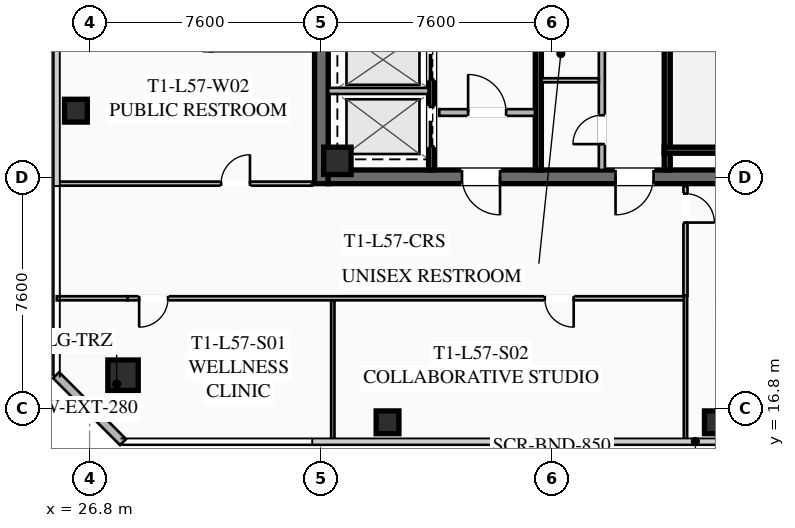
"""IFC4 building model, lengths in metres.
Left out: names, types, materials, properties, quantities, classifications, styles, units other than length and angle.
Written with IfcOpenShell. Run it as: python <this file> out.ifc"""

import sys

from ifc_helpers import new_model, si_unit, direction, frame, frame_2d, origin, origin_2d, place, context, subcontext, project, spatial, rectangle, hollow_rectangle, extrude, element, fill, save


model = new_model("IFC4")
c1 = context("Model", 3, precision=1e-05, world=origin(), true_north=direction((0.0, 1.0)))
c2 = subcontext(c1, "Body", "Model", "MODEL_VIEW")
j1 = project(units=[si_unit("LENGTHUNIT", "METRE"), si_unit("PLANEANGLEUNIT", "RADIAN")], contexts=[c1])
p1 = place(None, origin())
s1 = spatial("IfcSite", under=j1, at=p1, CompositionType="ELEMENT")
p2 = place(p1, origin())
s2 = spatial("IfcBuilding", under=s1, at=p2, CompositionType="ELEMENT")
p3 = place(p2, frame((0.0, 0.0, 211.3)))
s3 = spatial("IfcBuildingStorey", under=s2, at=p3, CompositionType="ELEMENT", Elevation=211.3)
p4 = place(p3, frame((34.425, 24.2, 0.0), z_axis=(0.0, 0.0, 1.0), x_axis=(0.0, 1.0, 0.0)))
e1 = element("IfcWall", 1, at=p4, inside=s3, PredefinedType="SHEAR", context=c2, shape_type="SweptSolid", body=[
    extrude(rectangle(XDim=15.6, YDim=0.45, at=frame_2d((7.8, 0.0))), origin(), (0.0, 0.0, 1.0), 3.55),
])
p5 = place(p3, frame((49.35, 24.425, 0.0), z_axis=(0.0, 0.0, 1.0), x_axis=(-1.0, 0.0, 0.0)))
e2 = element("IfcWall", 2, at=p5, inside=s3, PredefinedType="SHEAR", context=c2, shape_type="SweptSolid", body=[
    extrude(rectangle(XDim=14.7, YDim=0.45, at=frame_2d((7.35, 0.0))), origin(), (0.0, 0.0, 1.0), 3.55),
])
p6 = place(p5, frame((9.05, 0.0, 0.0)))
e3 = element("IfcOpeningElement", 3, at=p6, cuts=e2, PredefinedType="OPENING", context=c2, shape_type="SweptSolid", body=[
    extrude(rectangle(XDim=1.25, YDim=2.25, at=frame_2d((0.625, 1.125))), frame((0.0, 0.235, 0.0), z_axis=(0.0, -1.0, 0.0), x_axis=(1.0, 0.0, 0.0)), (0.0, 0.0, 1.0), 0.47),
])
p7 = place(p5, frame((4.0, 0.0, 0.0)))
e4 = element("IfcOpeningElement", 4, at=p7, cuts=e2, PredefinedType="OPENING", context=c2, shape_type="SweptSolid", body=[
    extrude(rectangle(XDim=1.25, YDim=2.25, at=frame_2d((0.625, 1.125))), frame((0.0, 0.235, 0.0), z_axis=(0.0, -1.0, 0.0), x_axis=(1.0, 0.0, 0.0)), (0.0, 0.0, 1.0), 0.47),
])
p8 = place(p3, frame((34.95, 24.95, 0.0), z_axis=(0.0, 0.0, 1.0), x_axis=(1.0, 0.0, 0.0)))
e5 = element("IfcColumn", 5, at=p8, inside=s3, PredefinedType="COLUMN", context=c2, shape_type="SweptSolid", body=[
    extrude(hollow_rectangle(XDim=0.9, YDim=0.9, WallThickness=0.04, at=origin_2d()), origin(), (0.0, 0.0, 1.0), 3.37),
])
p9 = place(p3, frame((27.9, 17.9, 0.0), z_axis=(0.0, 0.0, 1.0), x_axis=(1.0, 0.0, 0.0)))
e6 = element("IfcColumn", 6, at=p9, inside=s3, PredefinedType="COLUMN", context=c2, shape_type="SweptSolid", body=[
    extrude(hollow_rectangle(XDim=1.0, YDim=1.0, WallThickness=0.04, at=origin_2d()), origin(), (0.0, 0.0, 1.0), 3.37),
])
for number, where, z_axis, x_axis in (
    (7, (36.6, 16.35, 0.0), (0.0, 0.0, 1.0), (1.0, 0.0, 0.0)),
    (8, (47.4, 16.35, 0.0), (0.0, 0.0, 1.0), (1.0, 0.0, 0.0)),
    (9, (26.35, 26.6, 0.0), (0.0, 0.0, 1.0), (1.0, 0.0, 0.0)),
):
    element("IfcColumn", number, at=place(p3, frame(where, z_axis=z_axis, x_axis=x_axis)), inside=s3, PredefinedType="COLUMN", context=c2, shape_type="SweptSolid", body=[
        extrude(hollow_rectangle(XDim=0.75, YDim=0.75, WallThickness=0.032, at=origin_2d()), origin(), (0.0, 0.0, 1.0), 3.37),
    ])
p10 = place(p3, frame((27.9, 15.7, 0.0), z_axis=(0.0, 0.0, 1.0), x_axis=(-0.707106781187, 0.707106781187, 0.0)))
e10 = element("IfcWall", 10, at=p10, inside=s3, PredefinedType="SOLIDWALL", context=c2, shape_type="SweptSolid", body=[
    extrude(rectangle(XDim=3.111, YDim=0.28, at=frame_2d((1.556, 0.0))), origin(), (0.0, 0.0, 1.0), 3.37),
])
p11 = place(p3, frame((45.8, 32.8, 0.0), z_axis=(0.0, 0.0, 1.0), x_axis=(0.0, -1.0, 0.0)))
e11 = element("IfcWall", 11, at=p11, inside=s3, PredefinedType="SHEAR", context=c2, shape_type="SweptSolid", body=[
    extrude(rectangle(XDim=8.15, YDim=0.2, at=frame_2d((4.075, 0.0))), origin(), (0.0, 0.0, 1.0), 3.37),
])
p12 = place(p11, frame((0.45, 0.0, 0.0)))
e12 = element("IfcOpeningElement", 12, at=p12, cuts=e11, PredefinedType="OPENING", context=c2, shape_type="SweptSolid", body=[
    extrude(rectangle(XDim=1.15, YDim=2.2, at=frame_2d((0.575, 1.1))), frame((0.0, 0.11, 0.0), z_axis=(0.0, -1.0, 0.0), x_axis=(1.0, 0.0, 0.0)), (0.0, 0.0, 1.0), 0.22),
])
p13 = place(p3, frame((45.7, 25.3, 0.0), z_axis=(0.0, 0.0, 1.0), x_axis=(1.0, 0.0, 0.0)))
e13 = element("IfcWall", 13, at=p13, inside=s3, PredefinedType="SHEAR", context=c2, shape_type="SweptSolid", body=[
    extrude(rectangle(XDim=3.65, YDim=0.2, at=frame_2d((1.825, 0.0))), origin(), (0.0, 0.0, 1.0), 3.37),
])
p14 = place(p3, frame((41.56, 24.65, 0.0), z_axis=(0.0, 0.0, 1.0), x_axis=(0.0, 1.0, 0.0)))
e14 = element("IfcWall", 14, at=p14, inside=s3, PredefinedType="SHEAR", context=c2, shape_type="SweptSolid", body=[
    extrude(rectangle(XDim=14.7, YDim=0.2, at=frame_2d((7.35, 0.0))), origin(), (0.0, 0.0, 1.0), 3.37),
])
p15 = place(p3, frame((38.3, 26.54, 0.0), z_axis=(0.0, 0.0, 1.0), x_axis=(1.0, 0.0, 0.0)))
e15 = element("IfcWall", 15, at=p15, inside=s3, PredefinedType="SOLIDWALL", context=c2, shape_type="SweptSolid", body=[
    extrude(rectangle(XDim=3.15, YDim=0.22, at=frame_2d((1.575, 0.0))), origin(), (0.0, 0.0, 1.0), 2.723),
])
p16 = place(p15, frame((0.95, 0.0, 0.0)))
e16 = element("IfcOpeningElement", 16, at=p16, cuts=e15, PredefinedType="OPENING", context=c2, shape_type="SweptSolid", body=[
    extrude(rectangle(XDim=1.25, YDim=2.25, at=frame_2d((0.625, 1.125))), frame((0.0, 0.12, 0.0), z_axis=(0.0, -1.0, 0.0), x_axis=(1.0, 0.0, 0.0)), (0.0, 0.0, 1.0), 0.24),
])
p17 = place(p3, frame((38.05, 24.65, 0.0), z_axis=(0.0, 0.0, 1.0), x_axis=(0.0, 1.0, 0.0)))
e17 = element("IfcWall", 17, at=p17, inside=s3, PredefinedType="SHEAR", context=c2, shape_type="SweptSolid", body=[
    extrude(rectangle(XDim=6.55, YDim=0.2, at=frame_2d((3.275, 0.0))), origin(), (0.0, 0.0, 1.0), 3.37),
])
p18 = place(p17, frame((4.975, 0.0, 0.0)))
e18 = element("IfcOpeningElement", 18, at=p18, cuts=e17, PredefinedType="OPENING", context=c2, shape_type="SweptSolid", body=[
    extrude(rectangle(XDim=1.3, YDim=2.25, at=frame_2d((0.65, 1.125))), frame((0.0, 0.11, 0.0), z_axis=(0.0, -1.0, 0.0), x_axis=(1.0, 0.0, 0.0)), (0.0, 0.0, 1.0), 0.22),
])
p19 = place(p17, frame((2.975, 0.0, 0.0)))
e19 = element("IfcOpeningElement", 19, at=p19, cuts=e17, PredefinedType="OPENING", context=c2, shape_type="SweptSolid", body=[
    extrude(rectangle(XDim=1.3, YDim=2.25, at=frame_2d((0.65, 1.125))), frame((0.0, 0.11, 0.0), z_axis=(0.0, -1.0, 0.0), x_axis=(1.0, 0.0, 0.0)), (0.0, 0.0, 1.0), 0.22),
])
p20 = place(p17, frame((0.775, 0.0, 0.0)))
e20 = element("IfcOpeningElement", 20, at=p20, cuts=e17, PredefinedType="OPENING", context=c2, shape_type="SweptSolid", body=[
    extrude(rectangle(XDim=1.3, YDim=2.25, at=frame_2d((0.65, 1.125))), frame((0.0, 0.11, 0.0), z_axis=(0.0, -1.0, 0.0), x_axis=(1.0, 0.0, 0.0)), (0.0, 0.0, 1.0), 0.22),
])
p21 = place(p3, frame((34.65, 27.25, 0.0), z_axis=(0.0, 0.0, 1.0), x_axis=(1.0, 0.0, 0.0)))
e21 = element("IfcWall", 21, at=p21, inside=s3, PredefinedType="SOLIDWALL", context=c2, shape_type="SweptSolid", body=[
    extrude(rectangle(XDim=3.3, YDim=0.2, at=frame_2d((1.65, 0.0))), origin(), (0.0, 0.0, 1.0), 3.37),
])
p22 = place(p3, frame((43.65, 24.65, 0.0), z_axis=(0.0, 0.0, 1.0), x_axis=(0.0, 1.0, 0.0)))
e22 = element("IfcWall", 22, at=p22, inside=s3, PredefinedType="SOLIDWALL", context=c2, shape_type="SweptSolid", body=[
    extrude(rectangle(XDim=7.0, YDim=0.2, at=frame_2d((3.5, 0.0))), origin(), (0.0, 0.0, 1.0), 2.723),
])
p23 = place(p22, frame((0.85, 0.0, 0.0)))
e23 = element("IfcOpeningElement", 23, at=p23, cuts=e22, PredefinedType="OPENING", context=c2, shape_type="SweptSolid", body=[
    extrude(rectangle(XDim=0.95, YDim=2.05, at=frame_2d((0.475, 1.025))), frame((0.0, 0.11, 0.0), z_axis=(0.0, -1.0, 0.0), x_axis=(1.0, 0.0, 0.0)), (0.0, 0.0, 1.0), 0.22),
])
p24 = place(p22, frame((4.8, 0.0, 0.0)))
e24 = element("IfcOpeningElement", 24, at=p24, cuts=e22, PredefinedType="OPENING", context=c2, shape_type="SweptSolid", body=[
    extrude(rectangle(XDim=1.05, YDim=2.2, at=frame_2d((0.525, 1.1))), frame((0.0, 0.11, 0.0), z_axis=(0.0, -1.0, 0.0), x_axis=(1.0, 0.0, 0.0)), (0.0, 0.0, 1.0), 0.22),
])
p25 = place(p3, frame((41.67, 27.6, 0.0), z_axis=(0.0, 0.0, 1.0), x_axis=(1.0, 0.0, 0.0)))
e25 = element("IfcWall", 25, at=p25, inside=s3, PredefinedType="PARTITIONING", context=c2, shape_type="SweptSolid", body=[
    extrude(rectangle(XDim=1.88, YDim=0.135, at=frame_2d((0.94, 0.0))), origin(), (0.0, 0.0, 1.0), 2.723),
])
p26 = place(p3, frame((46.4, 20.43, 0.0), z_axis=(0.0, 0.0, 1.0), x_axis=(-1.0, 0.0, 0.0)))
e26 = element("IfcWall", 26, at=p26, inside=s3, PredefinedType="PARTITIONING", context=c2, shape_type="SweptSolid", body=[
    extrude(rectangle(XDim=18.35, YDim=0.135, at=frame_2d((9.175, 0.0))), origin(), (0.0, 0.0, 1.0), 2.723),
])
p27 = place(p26, frame((17.02, 0.0, 0.0)))
e27 = element("IfcOpeningElement", 27, at=p27, cuts=e26, PredefinedType="OPENING", context=c2, shape_type="SweptSolid", body=[
    extrude(rectangle(XDim=0.95, YDim=2.05, at=frame_2d((0.475, 1.025))), frame((0.0, 0.077, 0.0), z_axis=(0.0, -1.0, 0.0), x_axis=(1.0, 0.0, 0.0)), (0.0, 0.0, 1.0), 0.155),
])
p28 = place(p26, frame((3.677, 0.0, 0.0)))
e28 = element("IfcOpeningElement", 28, at=p28, cuts=e26, PredefinedType="OPENING", context=c2, shape_type="SweptSolid", body=[
    extrude(rectangle(XDim=0.95, YDim=2.05, at=frame_2d((0.475, 1.025))), frame((0.0, 0.077, 0.0), z_axis=(0.0, -1.0, 0.0), x_axis=(1.0, 0.0, 0.0)), (0.0, 0.0, 1.0), 0.155),
])
p29 = place(p3, frame((25.72, 20.43, 0.0), z_axis=(0.0, 0.0, 1.0), x_axis=(1.0, 0.0, 0.0)))
e29 = element("IfcWall", 29, at=p29, inside=s3, PredefinedType="PARTITIONING", context=c2, shape_type="SweptSolid", body=[
    extrude(rectangle(XDim=2.33, YDim=0.135, at=frame_2d((1.165, 0.0))), origin(), (0.0, 0.0, 1.0), 2.723),
])
p30 = place(p3, frame((46.4, 24.12, 0.0), z_axis=(0.0, 0.0, 1.0), x_axis=(0.0, -1.0, 0.0)))
e30 = element("IfcWall", 30, at=p30, inside=s3, PredefinedType="PARTITIONING", context=c2, shape_type="SweptSolid", body=[
    extrude(rectangle(XDim=3.61, YDim=0.135, at=frame_2d((1.805, 0.0))), origin(), (0.0, 0.0, 1.0), 2.723),
])
p31 = place(p30, frame((0.25, 0.0, 0.0)))
e31 = element("IfcOpeningElement", 31, at=p31, cuts=e30, PredefinedType="OPENING", context=c2, shape_type="SweptSolid", body=[
    extrude(rectangle(XDim=0.95, YDim=2.05, at=frame_2d((0.475, 1.025))), frame((0.0, 0.077, 0.0), z_axis=(0.0, -1.0, 0.0), x_axis=(1.0, 0.0, 0.0)), (0.0, 0.0, 1.0), 0.155),
])
p32 = place(p3, frame((34.8, 15.72, 0.0), z_axis=(0.0, 0.0, 1.0), x_axis=(0.0, 1.0, 0.0)))
e32 = element("IfcWall", 32, at=p32, inside=s3, PredefinedType="PARTITIONING", context=c2, shape_type="SweptSolid", body=[
    extrude(rectangle(XDim=4.63, YDim=0.11, at=frame_2d((2.315, 0.0))), origin(), (0.0, 0.0, 1.0), 2.723),
])
p33 = place(p3, frame((46.4, 15.72, 0.0), z_axis=(0.0, 0.0, 1.0), x_axis=(0.0, 1.0, 0.0)))
e33 = element("IfcWall", 33, at=p33, inside=s3, PredefinedType="PARTITIONING", context=c2, shape_type="SweptSolid", body=[
    extrude(rectangle(XDim=4.79, YDim=0.11, at=frame_2d((2.395, 0.0))), origin(), (0.0, 0.0, 1.0), 2.723),
])
p34 = place(p3, frame((25.72, 24.2, 0.0), z_axis=(0.0, 0.0, 1.0), x_axis=(1.0, 0.0, 0.0)))
e34 = element("IfcWall", 34, at=p34, inside=s3, PredefinedType="PARTITIONING", context=c2, shape_type="SweptSolid", body=[
    extrude(rectangle(XDim=8.4, YDim=0.135, at=frame_2d((4.2, 0.0))), origin(), (0.0, 0.0, 1.0), 2.723),
])
p35 = place(p34, frame((5.405, 0.0, 0.0)))
e35 = element("IfcOpeningElement", 35, at=p35, cuts=e34, PredefinedType="OPENING", context=c2, shape_type="SweptSolid", body=[
    extrude(rectangle(XDim=0.95, YDim=2.05, at=frame_2d((0.475, 1.025))), frame((0.0, 0.077, 0.0), z_axis=(0.0, -1.0, 0.0), x_axis=(1.0, 0.0, 0.0)), (0.0, 0.0, 1.0), 0.155),
])
p36 = place(p6, origin())
e36 = element("IfcDoor", 36, at=p36, inside=s3, OperationType="SINGLE_SWING_LEFT", PredefinedType="DOOR", context=c2, shape_type="SweptSolid", body=[
    extrude(rectangle(XDim=1.25, YDim=2.25, at=frame_2d((0.625, 1.125))), frame((0.0, 0.025, 0.0), z_axis=(0.0, -1.0, 0.0), x_axis=(1.0, 0.0, 0.0)), (0.0, 0.0, 1.0), 0.05),
])
fill(e3, e36)
p37 = place(p7, origin())
e37 = element("IfcDoor", 37, at=p37, inside=s3, OperationType="SINGLE_SWING_RIGHT", PredefinedType="DOOR", context=c2, shape_type="SweptSolid", body=[
    extrude(rectangle(XDim=1.25, YDim=2.25, at=frame_2d((0.625, 1.125))), frame((0.0, 0.025, 0.0), z_axis=(0.0, -1.0, 0.0), x_axis=(1.0, 0.0, 0.0)), (0.0, 0.0, 1.0), 0.05),
])
fill(e4, e37)
p38 = place(p16, origin())
e38 = element("IfcDoor", 38, at=p38, inside=s3, OperationType="SINGLE_SWING_LEFT", PredefinedType="DOOR", context=c2, shape_type="SweptSolid", body=[
    extrude(rectangle(XDim=1.25, YDim=2.25, at=frame_2d((0.625, 1.125))), frame((0.0, 0.025, 0.0), z_axis=(0.0, -1.0, 0.0), x_axis=(1.0, 0.0, 0.0)), (0.0, 0.0, 1.0), 0.05),
])
fill(e16, e38)
p39 = place(p23, origin())
e39 = element("IfcDoor", 39, at=p39, inside=s3, OperationType="SINGLE_SWING_LEFT", PredefinedType="DOOR", context=c2, shape_type="SweptSolid", body=[
    extrude(rectangle(XDim=0.95, YDim=2.05, at=frame_2d((0.475, 1.025))), frame((0.0, 0.025, 0.0), z_axis=(0.0, -1.0, 0.0), x_axis=(1.0, 0.0, 0.0)), (0.0, 0.0, 1.0), 0.05),
])
fill(e23, e39)
p40 = place(p27, origin())
e40 = element("IfcDoor", 40, at=p40, inside=s3, OperationType="SINGLE_SWING_RIGHT", PredefinedType="DOOR", context=c2, shape_type="SweptSolid", body=[
    extrude(rectangle(XDim=0.95, YDim=2.05, at=frame_2d((0.475, 1.025))), frame((0.0, 0.025, 0.0), z_axis=(0.0, -1.0, 0.0), x_axis=(1.0, 0.0, 0.0)), (0.0, 0.0, 1.0), 0.05),
])
fill(e27, e40)
p41 = place(p28, origin())
e41 = element("IfcDoor", 41, at=p41, inside=s3, OperationType="SINGLE_SWING_LEFT", PredefinedType="DOOR", context=c2, shape_type="SweptSolid", body=[
    extrude(rectangle(XDim=0.95, YDim=2.05, at=frame_2d((0.475, 1.025))), frame((0.0, 0.025, 0.0), z_axis=(0.0, -1.0, 0.0), x_axis=(1.0, 0.0, 0.0)), (0.0, 0.0, 1.0), 0.05),
])
fill(e28, e41)
p42 = place(p31, origin())
e42 = element("IfcDoor", 42, at=p42, inside=s3, OperationType="SINGLE_SWING_RIGHT", PredefinedType="DOOR", context=c2, shape_type="SweptSolid", body=[
    extrude(rectangle(XDim=0.95, YDim=2.05, at=frame_2d((0.475, 1.025))), frame((0.0, 0.025, 0.0), z_axis=(0.0, -1.0, 0.0), x_axis=(1.0, 0.0, 0.0)), (0.0, 0.0, 1.0), 0.05),
])
fill(e31, e42)
p43 = place(p35, origin())
e43 = element("IfcDoor", 43, at=p43, inside=s3, OperationType="SINGLE_SWING_RIGHT", PredefinedType="DOOR", context=c2, shape_type="SweptSolid", body=[
    extrude(rectangle(XDim=0.95, YDim=2.05, at=frame_2d((0.475, 1.025))), frame((0.0, 0.025, 0.0), z_axis=(0.0, -1.0, 0.0), x_axis=(1.0, 0.0, 0.0)), (0.0, 0.0, 1.0), 0.05),
])
fill(e35, e43)
p44 = place(p19, origin())
e44 = element("IfcDoor", 44, at=p44, inside=s3, OperationType="SLIDING_TO_LEFT", PredefinedType="DOOR", context=c2, shape_type="SweptSolid", body=[
    extrude(rectangle(XDim=1.3, YDim=2.25, at=frame_2d((0.65, 1.125))), frame((0.0, 0.025, 0.0), z_axis=(0.0, -1.0, 0.0), x_axis=(1.0, 0.0, 0.0)), (0.0, 0.0, 1.0), 0.05),
])
fill(e19, e44)
p45 = place(p20, origin())
e45 = element("IfcDoor", 45, at=p45, inside=s3, OperationType="SLIDING_TO_LEFT", PredefinedType="DOOR", context=c2, shape_type="SweptSolid", body=[
    extrude(rectangle(XDim=1.3, YDim=2.25, at=frame_2d((0.65, 1.125))), frame((0.0, 0.025, 0.0), z_axis=(0.0, -1.0, 0.0), x_axis=(1.0, 0.0, 0.0)), (0.0, 0.0, 1.0), 0.05),
])
fill(e20, e45)
save(model, sys.argv[1])
